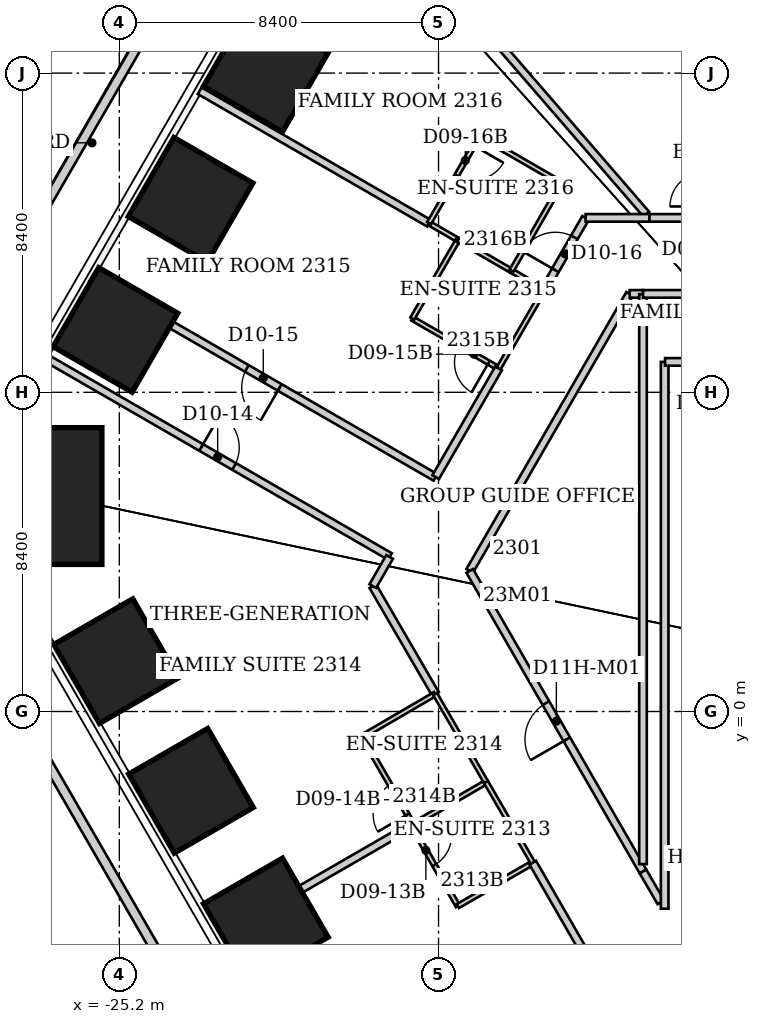
"""IFC4 building model, lengths in metres.
Left out: names, types, materials, properties, quantities, classifications, styles, units other than length and angle.
Written with IfcOpenShell. Run it as: python <this file> out.ifc"""

import sys

from ifc_helpers import new_model, si_unit, direction, frame, frame_2d, origin, origin_2d, place, context, subcontext, project, spatial, rectangle, extrude, clip, halfspace, element, fill, save


model = new_model("IFC4")
c1 = context("Model", 3, precision=1e-05, world=origin(), true_north=direction((0.0, 1.0)))
c2 = subcontext(c1, "Body", "Model", "MODEL_VIEW")
j1 = project(units=[si_unit("LENGTHUNIT", "METRE"), si_unit("PLANEANGLEUNIT", "RADIAN")], contexts=[c1])
p1 = place(None, origin())
s1 = spatial("IfcSite", under=j1, at=p1, CompositionType="ELEMENT")
p2 = place(p1, origin())
s2 = spatial("IfcBuilding", under=s1, at=p2, CompositionType="ELEMENT")
p3 = place(p2, frame((0.0, 0.0, 96.8)))
s3 = spatial("IfcBuildingStorey", under=s2, at=p3, CompositionType="ELEMENT", Elevation=96.8)
p4 = place(p3, frame((-21.344, -5.499, -0.056), z_axis=(0.0, 0.0, 1.0), x_axis=(-0.866025403784, -0.5, 0.0)))
e1 = element("IfcColumn", 1, at=p4, inside=s3, PredefinedType="COLUMN", context=c2, shape_type="SweptSolid", body=[
    clip(extrude(rectangle(XDim=2.4, YDim=2.4, at=origin_2d()), origin(), (0.0, 0.0, 1.0), 3.856), halfspace(frame((0.0, 0.0, 0.056)), True)),
])
p5 = place(p3, frame((-23.314, -2.087, -0.064), z_axis=(0.0, 0.0, 1.0), x_axis=(-0.866025403784, -0.5, 0.0)))
e2 = element("IfcColumn", 2, at=p5, inside=s3, PredefinedType="COLUMN", context=c2, shape_type="SweptSolid", body=[
    clip(extrude(rectangle(XDim=2.4, YDim=2.4, at=origin_2d()), origin(), (0.0, 0.0, 1.0), 3.865), halfspace(frame((0.0, 0.0, 0.064)), True)),
])
p6 = place(p3, frame((-25.284, 1.325, -0.073), z_axis=(0.0, 0.0, 1.0), x_axis=(-0.866025403784, -0.5, 0.0)))
e3 = element("IfcColumn", 3, at=p6, inside=s3, PredefinedType="COLUMN", context=c2, shape_type="SweptSolid", body=[
    clip(extrude(rectangle(XDim=2.4, YDim=2.4, at=origin_2d()), origin(), (0.0, 0.0, 1.0), 3.873), halfspace(frame((0.0, 0.0, 0.073)), True)),
])
p7 = place(p3, frame((-26.857, 5.67, -0.074), z_axis=(0.0, 0.0, 1.0), x_axis=(-1.0, 0.0, 0.0)))
e4 = element("IfcColumn", 4, at=p7, inside=s3, PredefinedType="COLUMN", context=c2, shape_type="SweptSolid", body=[
    clip(extrude(rectangle(XDim=2.4, YDim=3.6, at=origin_2d()), origin(), (0.0, 0.0, 1.0), 3.874), halfspace(frame((0.0, 0.0, 0.074)), True)),
])
p8 = place(p3, frame((-25.302, 10.041, -0.063), z_axis=(0.0, 0.0, 1.0), x_axis=(-0.866025403784, 0.5, 0.0)))
e5 = element("IfcColumn", 5, at=p8, inside=s3, PredefinedType="COLUMN", context=c2, shape_type="SweptSolid", body=[
    clip(extrude(rectangle(XDim=2.4, YDim=2.4, at=origin_2d()), origin(), (0.0, 0.0, 1.0), 3.863), halfspace(frame((0.0, 0.0, 0.063)), True)),
])
p9 = place(p3, frame((-23.324, 13.466, -0.055), z_axis=(0.0, 0.0, 1.0), x_axis=(-0.866025403784, 0.5, 0.0)))
e6 = element("IfcColumn", 6, at=p9, inside=s3, PredefinedType="COLUMN", context=c2, shape_type="SweptSolid", body=[
    clip(extrude(rectangle(XDim=2.4, YDim=2.4, at=origin_2d()), origin(), (0.0, 0.0, 1.0), 3.855), halfspace(frame((0.0, 0.0, 0.055)), True)),
])
p10 = place(p3, frame((-21.346, 16.891, -0.063), z_axis=(0.0, 0.0, 1.0), x_axis=(-0.866025403784, 0.5, 0.0)))
e7 = element("IfcColumn", 7, at=p10, inside=s3, PredefinedType="COLUMN", context=c2, shape_type="SweptSolid", body=[
    clip(extrude(rectangle(XDim=2.4, YDim=2.4, at=origin_2d()), origin(), (0.0, 0.0, 1.0), 3.863), halfspace(frame((0.0, 0.0, 0.063)), True)),
])
p11 = place(p3, frame((-21.475, 23.139, 0.0), z_axis=(0.0, 0.0, 1.0), x_axis=(-0.499999656836, -0.86602560191, 0.0)))
e8 = element("IfcWall", 8, at=p11, inside=s3, PredefinedType="PARAPET", context=c2, shape_type="SweptSolid", body=[
    extrude(rectangle(XDim=18.602, YDim=0.25, at=frame_2d((9.301, 0.0))), origin(), (0.0, 0.0, 1.0), 1.1),
])
p12 = place(p3, frame((-30.775, 5.038, 0.0), z_axis=(0.0, 0.0, 1.0), x_axis=(0.499999235055, -0.866025845425, 0.0)))
e9 = element("IfcWall", 9, at=p12, inside=s3, PredefinedType="PARAPET", context=c2, shape_type="SweptSolid", body=[
    extrude(rectangle(XDim=39.5, YDim=0.25, at=frame_2d((19.75, 0.0))), origin(), (0.0, 0.0, 1.0), 1.1),
])
p13 = place(p3, frame((-27.144, 9.315, 0.0), z_axis=(0.0, 0.0, 1.0), x_axis=(0.865951726818, -0.500127590541, 0.0)))
e10 = element("IfcWall", 10, at=p13, inside=s3, PredefinedType="PARTITIONING", context=c2, shape_type="SweptSolid", body=[
    extrude(rectangle(XDim=10.467, YDim=0.2, at=frame_2d((5.233, 0.0))), origin(), (0.0, 0.0, 1.0), 3.64),
])
p14 = place(p13, frame((4.734, 0.0, 0.0)))
e11 = element("IfcOpeningElement", 11, at=p14, cuts=e10, PredefinedType="OPENING", context=c2, shape_type="SweptSolid", body=[
    extrude(rectangle(XDim=1.0, YDim=2.13, at=frame_2d((0.5, 1.065))), frame((0.0, 0.1, 0.0), z_axis=(0.0, -1.0, 0.0), x_axis=(1.0, 0.0, 0.0)), (0.0, 0.0, 1.0), 0.2),
])
p15 = place(p3, frame((-23.084, 16.335, 0.0), z_axis=(0.0, 0.0, 1.0), x_axis=(0.865889693368, -0.500234983702, 0.0)))
e12 = element("IfcWall", 12, at=p15, inside=s3, PredefinedType="PARTITIONING", context=c2, shape_type="SweptSolid", body=[
    extrude(rectangle(XDim=6.968, YDim=0.2, at=frame_2d((3.484, 0.0))), origin(), (0.0, 0.0, 1.0), 3.64),
])
p16 = place(p3, frame((-18.81, -0.66, 0.0), z_axis=(0.0, 0.0, 1.0), x_axis=(0.501789229896, -0.86498992408, 0.0)))
e13 = element("IfcWall", 13, at=p16, inside=s3, PredefinedType="PARTITIONING", context=c2, shape_type="SweptSolid", body=[
    extrude(rectangle(XDim=2.671, YDim=0.12, at=frame_2d((1.335, 0.0))), origin(), (0.0, 0.0, 1.0), 3.64),
])
p17 = place(p16, frame((1.47, 0.0, 0.0)))
e14 = element("IfcOpeningElement", 14, at=p17, cuts=e13, PredefinedType="OPENING", context=c2, shape_type="SweptSolid", body=[
    extrude(rectangle(XDim=0.9, YDim=2.03, at=frame_2d((0.45, 1.015))), frame((0.0, 0.06, 0.0), z_axis=(0.0, -1.0, 0.0), x_axis=(1.0, 0.0, 0.0)), (0.0, 0.0, 1.0), 0.12),
])
p18 = place(p3, frame((-18.53, 3.3, 0.0), z_axis=(0.0, 0.0, 1.0), x_axis=(0.502321995867, -0.864680641895, 0.0)))
e15 = element("IfcWall", 15, at=p18, inside=s3, PredefinedType="PARTITIONING", context=c2, shape_type="SweptSolid", body=[
    extrude(rectangle(XDim=3.285, YDim=0.2, at=frame_2d((1.642, 0.0))), origin(), (0.0, 0.0, 1.0), 3.64),
])
p19 = place(p3, frame((-18.087, 4.067, 0.0), z_axis=(0.0, 0.0, 1.0), x_axis=(-0.499905448813, -0.866079986056, 0.0)))
e16 = element("IfcWall", 16, at=p19, inside=s3, PredefinedType="PARTITIONING", context=c2, shape_type="SweptSolid", body=[
    extrude(rectangle(XDim=0.885, YDim=0.2, at=frame_2d((0.443, 0.0))), origin(), (0.0, 0.0, 1.0), 3.64),
])
p20 = place(p3, frame((-17.51, -3.0, 0.0), z_axis=(0.0, 0.0, 1.0), x_axis=(0.864434275542, 0.502745843611, 0.0)))
e17 = element("IfcWall", 17, at=p20, inside=s3, PredefinedType="PARTITIONING", context=c2, shape_type="SweptSolid", body=[
    extrude(rectangle(XDim=2.267, YDim=0.12, at=frame_2d((1.134, 0.0))), origin(), (0.0, 0.0, 1.0), 3.64),
])
p21 = place(p3, frame((-17.508, -3.004, 0.0), z_axis=(0.0, 0.0, 1.0), x_axis=(0.498775507858, -0.866731211369, 0.0)))
e18 = element("IfcWall", 18, at=p21, inside=s3, PredefinedType="PARTITIONING", context=c2, shape_type="SweptSolid", body=[
    extrude(rectangle(XDim=2.441, YDim=0.12, at=frame_2d((1.22, 0.0))), origin(), (0.0, 0.0, 1.0), 3.64),
])
p22 = place(p21, frame((0.3, 0.0, 0.0)))
e19 = element("IfcOpeningElement", 19, at=p22, cuts=e18, PredefinedType="OPENING", context=c2, shape_type="SweptSolid", body=[
    extrude(rectangle(XDim=0.9, YDim=2.03, at=frame_2d((0.45, 1.015))), frame((0.0, 0.06, 0.0), z_axis=(0.0, -1.0, 0.0), x_axis=(1.0, 0.0, 0.0)), (0.0, 0.0, 1.0), 0.12),
])
p23 = place(p3, frame((-17.49, 10.34, 0.0), z_axis=(0.0, 0.0, 1.0), x_axis=(0.866114241029, -0.499846097802, 0.0)))
e20 = element("IfcWall", 20, at=p23, inside=s3, PredefinedType="PARTITIONING", context=c2, shape_type="SweptSolid", body=[
    extrude(rectangle(XDim=2.621, YDim=0.12, at=frame_2d((1.311, 0.0))), origin(), (0.0, 0.0, 1.0), 3.64),
])
p24 = place(p23, frame((1.421, 0.0, 0.0)))
e21 = element("IfcOpeningElement", 21, at=p24, cuts=e20, PredefinedType="OPENING", context=c2, shape_type="SweptSolid", body=[
    extrude(rectangle(XDim=0.9, YDim=2.03, at=frame_2d((0.45, 1.015))), frame((0.0, 0.06, 0.0), z_axis=(0.0, -1.0, 0.0), x_axis=(1.0, 0.0, 0.0)), (0.0, 0.0, 1.0), 0.12),
])
p25 = place(p3, frame((-17.47, -2.97, 0.0), z_axis=(0.0, 0.0, 1.0), x_axis=(-0.865919350456, -0.50018364478, 0.0)))
e22 = element("IfcWall", 22, at=p25, inside=s3, PredefinedType="PARTITIONING", context=c2, shape_type="SweptSolid", body=[
    extrude(rectangle(XDim=5.758, YDim=0.2, at=frame_2d((2.879, 0.0))), origin(), (0.0, 0.0, 1.0), 3.64),
])
p26 = place(p3, frame((-17.051, 12.849, 0.0), z_axis=(0.0, 0.0, 1.0), x_axis=(0.865838315616, -0.500323906295, 0.0)))
e23 = element("IfcWall", 23, at=p26, inside=s3, PredefinedType="PARTITIONING", context=c2, shape_type="SweptSolid", body=[
    extrude(rectangle(XDim=0.878, YDim=0.12, at=frame_2d((0.439, 0.0))), origin(), (0.0, 0.0, 1.0), 3.64),
])
p27 = place(p3, frame((-16.89, 0.46, 0.0), z_axis=(0.0, 0.0, 1.0), x_axis=(-0.863822716314, -0.503795905878, 0.0)))
e24 = element("IfcWall", 24, at=p27, inside=s3, PredefinedType="PARTITIONING", context=c2, shape_type="SweptSolid", body=[
    extrude(rectangle(XDim=2.223, YDim=0.12, at=frame_2d((1.111, 0.0))), origin(), (0.0, 0.0, 1.0), 3.64),
])
p28 = place(p3, frame((-16.88, 6.16, 0.0), z_axis=(0.0, 0.0, 1.0), x_axis=(-0.86594745947, 0.500134979218, 0.0)))
e25 = element("IfcWall", 25, at=p28, inside=s3, PredefinedType="PARTITIONING", context=c2, shape_type="SweptSolid", body=[
    extrude(rectangle(XDim=10.467, YDim=0.2, at=frame_2d((5.234, 0.0))), origin(), (0.0, 0.0, 1.0), 3.64),
])
p29 = place(p28, frame((4.734, 0.0, 0.0)))
e26 = element("IfcOpeningElement", 26, at=p29, cuts=e25, PredefinedType="OPENING", context=c2, shape_type="SweptSolid", body=[
    extrude(rectangle(XDim=1.0, YDim=2.13, at=frame_2d((0.5, 1.065))), frame((0.0, 0.1, 0.0), z_axis=(0.0, -1.0, 0.0), x_axis=(1.0, 0.0, 0.0)), (0.0, 0.0, 1.0), 0.2),
])
p30 = place(p3, frame((-16.875, 6.169, 0.0), z_axis=(0.0, 0.0, 1.0), x_axis=(0.500689767595, 0.865626799854, 0.0)))
e27 = element("IfcWall", 27, at=p30, inside=s3, PredefinedType="PARTITIONING", context=c2, shape_type="SweptSolid", body=[
    extrude(rectangle(XDim=3.305, YDim=0.2, at=frame_2d((1.653, 0.0))), origin(), (0.0, 0.0, 1.0), 3.64),
])
p31 = place(p3, frame((-16.29, -5.12, 0.0), z_axis=(0.0, 0.0, 1.0), x_axis=(0.865497265561, 0.500913648553, 0.0)))
e28 = element("IfcWall", 28, at=p31, inside=s3, PredefinedType="PARTITIONING", context=c2, shape_type="SweptSolid", body=[
    extrude(rectangle(XDim=2.276, YDim=0.12, at=frame_2d((1.138, 0.0))), origin(), (0.0, 0.0, 1.0), 3.64),
])
p32 = place(p3, frame((-16.29, 12.41, 0.0), z_axis=(0.0, 0.0, 1.0), x_axis=(-0.501547039172, -0.865130376012, 0.0)))
e29 = element("IfcWall", 29, at=p32, inside=s3, PredefinedType="PARTITIONING", context=c2, shape_type="SweptSolid", body=[
    extrude(rectangle(XDim=2.393, YDim=0.12, at=frame_2d((1.196, 0.0))), origin(), (0.0, 0.0, 1.0), 3.64),
])
p33 = place(p3, frame((-16.29, 12.41, 0.0), z_axis=(0.0, 0.0, 1.0), x_axis=(0.866138091645, -0.499804768086, 0.0)))
e30 = element("IfcWall", 30, at=p33, inside=s3, PredefinedType="PARTITIONING", context=c2, shape_type="SweptSolid", body=[
    extrude(rectangle(XDim=1.626, YDim=0.12, at=frame_2d((0.813, 0.0))), origin(), (0.0, 0.0, 1.0), 3.64),
])
p34 = place(p3, frame((-15.98, 3.7, 0.0), z_axis=(0.0, 0.0, 1.0), x_axis=(0.500093981358, 0.865971136822, 0.0)))
e31 = element("IfcWall", 31, at=p34, inside=s3, PredefinedType="PARTITIONING", context=c2, shape_type="SweptSolid", body=[
    extrude(rectangle(XDim=8.418, YDim=0.2, at=frame_2d((4.209, 0.0))), origin(), (0.0, 0.0, 1.0), 3.64),
])
p35 = place(p3, frame((-15.72, 15.15, 0.0), z_axis=(0.0, 0.0, 1.0), x_axis=(-0.500605174168, -0.865675724273, 0.0)))
e32 = element("IfcWall", 32, at=p35, inside=s3, PredefinedType="PARTITIONING", context=c2, shape_type="SweptSolid", body=[
    extrude(rectangle(XDim=2.657, YDim=0.12, at=frame_2d((1.329, 0.0))), origin(), (0.0, 0.0, 1.0), 3.64),
])
p36 = place(p35, frame((0.3, 0.0, 0.0)))
e33 = element("IfcOpeningElement", 33, at=p36, cuts=e32, PredefinedType="OPENING", context=c2, shape_type="SweptSolid", body=[
    extrude(rectangle(XDim=0.9, YDim=2.03, at=frame_2d((0.45, 1.015))), frame((0.0, 0.06, 0.0), z_axis=(0.0, -1.0, 0.0), x_axis=(1.0, 0.0, 0.0)), (0.0, 0.0, 1.0), 0.12),
])
p37 = place(p3, frame((-15.55, -1.86, 0.0), z_axis=(0.0, 0.0, 1.0), x_axis=(-0.500098439427, 0.865968562295, 0.0)))
e34 = element("IfcWall", 34, at=p37, inside=s3, PredefinedType="PARTITIONING", context=c2, shape_type="SweptSolid", body=[
    extrude(rectangle(XDim=2.679, YDim=0.12, at=frame_2d((1.34, 0.0))), origin(), (0.0, 0.0, 1.0), 3.64),
])
p38 = place(p3, frame((-15.55, -1.86, 0.0), z_axis=(0.0, 0.0, 1.0), x_axis=(0.501856726365, -0.86495076519, 0.0)))
e35 = element("IfcWall", 35, at=p38, inside=s3, PredefinedType="PARTITIONING", context=c2, shape_type="SweptSolid", body=[
    extrude(rectangle(XDim=2.451, YDim=0.12, at=frame_2d((1.226, 0.0))), origin(), (0.0, 0.0, 1.0), 3.64),
])
p39 = place(p3, frame((-15.22, 9.03, 0.0), z_axis=(0.0, 0.0, 1.0), x_axis=(0.501502765098, 0.865156041763, 0.0)))
e36 = element("IfcWall", 36, at=p39, inside=s3, PredefinedType="PARTITIONING", context=c2, shape_type="SweptSolid", body=[
    extrude(rectangle(XDim=2.393, YDim=0.12, at=frame_2d((1.196, 0.0))), origin(), (0.0, 0.0, 1.0), 3.64),
])
p40 = place(p3, frame((-14.882, 11.597, 0.0), z_axis=(0.0, 0.0, 1.0), x_axis=(0.866181499781, -0.499729536286, 0.0)))
e37 = element("IfcWall", 37, at=p40, inside=s3, PredefinedType="PARTITIONING", context=c2, shape_type="SweptSolid", body=[
    extrude(rectangle(XDim=0.995, YDim=0.12, at=frame_2d((0.497, 0.0))), origin(), (0.0, 0.0, 1.0), 3.64),
])
p41 = place(p3, frame((-14.88, 11.6, 0.0), z_axis=(0.0, 0.0, 1.0), x_axis=(0.497704656183, 0.867346571569, 0.0)))
e38 = element("IfcWall", 38, at=p41, inside=s3, PredefinedType="PARTITIONING", context=c2, shape_type="SweptSolid", body=[
    extrude(rectangle(XDim=2.652, YDim=0.12, at=frame_2d((1.326, 0.0))), origin(), (0.0, 0.0, 1.0), 3.64),
])
p42 = place(p3, frame((-14.32, -3.98, 0.0), z_axis=(0.0, 0.0, 1.0), x_axis=(0.499495696009, -0.866316368118, 0.0)))
e39 = element("IfcWall", 39, at=p42, inside=s3, PredefinedType="PARTITIONING", context=c2, shape_type="SweptSolid", body=[
    extrude(rectangle(XDim=8.669, YDim=0.2, at=frame_2d((4.334, 0.0))), origin(), (0.0, 0.0, 1.0), 3.64),
])
p43 = place(p42, frame((3.834, 0.0, 0.0)))
e40 = element("IfcOpeningElement", 40, at=p43, cuts=e39, PredefinedType="OPENING", context=c2, shape_type="SweptSolid", body=[
    extrude(rectangle(XDim=1.0, YDim=2.13, at=frame_2d((0.5, 1.065))), frame((0.0, 0.1, 0.0), z_axis=(0.0, -1.0, 0.0), x_axis=(1.0, 0.0, 0.0)), (0.0, 0.0, 1.0), 0.2),
])
p44 = place(p3, frame((-14.02, 11.1, 0.0), z_axis=(0.0, 0.0, 1.0), x_axis=(0.499641723021, 0.866232156305, 0.0)))
e41 = element("IfcWall", 41, at=p44, inside=s3, PredefinedType="PARTITIONING", context=c2, shape_type="SweptSolid", body=[
    extrude(rectangle(XDim=2.182, YDim=0.2, at=frame_2d((1.091, 0.0))), origin(), (0.0, 0.0, 1.0), 3.64),
])
p45 = place(p44, frame((0.591, 0.0, 0.0)))
e42 = element("IfcOpeningElement", 42, at=p45, cuts=e41, PredefinedType="OPENING", context=c2, shape_type="SweptSolid", body=[
    extrude(rectangle(XDim=1.0, YDim=2.13, at=frame_2d((0.5, 1.065))), frame((0.0, 0.1, 0.0), z_axis=(0.0, -1.0, 0.0), x_axis=(1.0, 0.0, 0.0)), (0.0, 0.0, 1.0), 0.2),
])
p46 = place(p3, frame((-13.56, 13.9, 0.0), z_axis=(0.0, 0.0, 1.0), x_axis=(-0.865508881864, 0.500893576935, 0.0)))
e43 = element("IfcWall", 43, at=p46, inside=s3, PredefinedType="PARTITIONING", context=c2, shape_type="SweptSolid", body=[
    extrude(rectangle(XDim=2.496, YDim=0.12, at=frame_2d((1.248, 0.0))), origin(), (0.0, 0.0, 1.0), 3.64),
])
p47 = place(p3, frame((-11.77, 10.99, 0.0), z_axis=(0.0, 0.0, 1.0), x_axis=(1.0, 0.0, 0.0)))
e44 = element("IfcWall", 44, at=p47, inside=s3, PredefinedType="PARTITIONING", context=c2, shape_type="SweptSolid", body=[
    extrude(rectangle(XDim=0.35, YDim=0.2, at=frame_2d((0.175, 0.0))), origin(), (0.0, 0.0, 1.0), 3.64),
])
p48 = place(p3, frame((-11.42, -4.21, 0.0), z_axis=(0.0, 0.0, 1.0), x_axis=(-0.499446957289, 0.866344467781, 0.0)))
e45 = element("IfcWall", 45, at=p48, inside=s3, PredefinedType="PARTITIONING", context=c2, shape_type="SweptSolid", body=[
    extrude(rectangle(XDim=9.13, YDim=0.2, at=frame_2d((4.565, 0.0))), origin(), (0.0, 0.0, 1.0), 3.64),
])
p49 = place(p48, frame((4.015, 0.0, 0.0)))
e46 = element("IfcOpeningElement", 46, at=p49, cuts=e45, PredefinedType="OPENING", context=c2, shape_type="SweptSolid", body=[
    extrude(rectangle(XDim=1.1, YDim=2.2, at=frame_2d((0.55, 1.1))), frame((0.0, 0.1, 0.0), z_axis=(0.0, -1.0, 0.0), x_axis=(1.0, 0.0, 0.0)), (0.0, 0.0, 1.0), 0.2),
])
p50 = place(p3, frame((-11.42, 10.98, 0.0), z_axis=(0.0, 0.0, 1.0), x_axis=(0.0, -1.0, 0.0)))
e47 = element("IfcWall", 47, at=p50, inside=s3, PredefinedType="PARTITIONING", context=c2, shape_type="SweptSolid", body=[
    extrude(rectangle(XDim=14.995, YDim=0.2, at=frame_2d((7.498, 0.0))), origin(), (0.0, 0.0, 1.0), 3.64),
])
p51 = place(p3, frame((-11.42, 10.99, 0.0), z_axis=(0.0, 0.0, 1.0), x_axis=(1.0, 0.0, 0.0)))
e48 = element("IfcWall", 48, at=p51, inside=s3, PredefinedType="PARTITIONING", context=c2, shape_type="SweptSolid", body=[
    extrude(rectangle(XDim=4.57, YDim=0.2, at=frame_2d((2.285, 0.0))), origin(), (0.0, 0.0, 1.0), 3.64),
])
p52 = place(p51, frame((1.735, 0.0, 0.0)))
e49 = element("IfcOpeningElement", 49, at=p52, cuts=e48, PredefinedType="OPENING", context=c2, shape_type="SweptSolid", body=[
    extrude(rectangle(XDim=1.1, YDim=2.2, at=frame_2d((0.55, 1.1))), frame((0.0, 0.1, 0.0), z_axis=(0.0, -1.0, 0.0), x_axis=(1.0, 0.0, 0.0)), (0.0, 0.0, 1.0), 0.2),
])
p53 = place(p3, frame((-11.335, 13.088, 0.0), z_axis=(0.0, 0.0, 1.0), x_axis=(-0.654526953183, 0.75603866803, 0.0)))
e50 = element("IfcWall", 50, at=p53, inside=s3, PredefinedType="PARTITIONING", context=c2, shape_type="SweptSolid", body=[
    extrude(rectangle(XDim=11.956, YDim=0.2, at=frame_2d((5.978, 0.0))), origin(), (0.0, 0.0, 1.0), 3.64),
])
p54 = place(p3, frame((-11.25, 12.99, 0.0), z_axis=(0.0, 0.0, 1.0), x_axis=(-1.0, 0.0, 0.0)))
e51 = element("IfcWall", 51, at=p54, inside=s3, PredefinedType="PARTITIONING", context=c2, shape_type="SweptSolid", body=[
    extrude(rectangle(XDim=1.68, YDim=0.2, at=frame_2d((0.84, 0.0))), origin(), (0.0, 0.0, 1.0), 3.64),
])
p55 = place(p3, frame((-10.948, -5.021, 0.0), z_axis=(0.0, 0.0, 1.0), x_axis=(-0.502706337432, 0.86445725071, 0.0)))
e52 = element("IfcWall", 52, at=p55, inside=s3, PredefinedType="PARTITIONING", context=c2, shape_type="SweptSolid", body=[
    extrude(rectangle(XDim=0.939, YDim=0.2, at=frame_2d((0.469, 0.0))), origin(), (0.0, 0.0, 1.0), 3.64),
])
p56 = place(p3, frame((-10.85, 9.2, 0.0), z_axis=(0.0, 0.0, 1.0), x_axis=(0.0, -1.0, 0.0)))
e53 = element("IfcWall", 53, at=p56, inside=s3, PredefinedType="PARTITIONING", context=c2, shape_type="SweptSolid", body=[
    extrude(rectangle(XDim=14.39, YDim=0.2, at=frame_2d((7.195, 0.0))), origin(), (0.0, 0.0, 1.0), 3.64),
])
p57 = place(p3, frame((-9.81, 12.99, 0.0), z_axis=(0.0, 0.0, 1.0), x_axis=(-1.0, 0.0, 0.0)))
e54 = element("IfcWall", 54, at=p57, inside=s3, PredefinedType="PARTITIONING", context=c2, shape_type="SweptSolid", body=[
    extrude(rectangle(XDim=1.44, YDim=0.2, at=frame_2d((0.72, 0.0))), origin(), (0.0, 0.0, 1.0), 3.64),
])
p58 = place(p3, frame((-6.85, 9.2, 0.0), z_axis=(0.0, 0.0, 1.0), x_axis=(-1.0, 0.0, 0.0)))
e55 = element("IfcWall", 55, at=p58, inside=s3, PredefinedType="PARTITIONING", context=c2, shape_type="SweptSolid", body=[
    extrude(rectangle(XDim=3.99, YDim=0.2, at=frame_2d((1.995, 0.0))), origin(), (0.0, 0.0, 1.0), 3.64),
])
p59 = place(p22, origin())
e56 = element("IfcDoor", 56, at=p59, inside=s3, OperationType="SINGLE_SWING_LEFT", PredefinedType="DOOR", context=c2, shape_type="SweptSolid", body=[
    extrude(rectangle(XDim=0.9, YDim=2.03, at=frame_2d((0.45, 1.015))), frame((0.0, 0.025, 0.0), z_axis=(0.0, -1.0, 0.0), x_axis=(1.0, 0.0, 0.0)), (0.0, 0.0, 1.0), 0.05),
])
fill(e19, e56)
p60 = place(p14, origin())
e57 = element("IfcDoor", 57, at=p60, inside=s3, OperationType="SINGLE_SWING_LEFT", PredefinedType="DOOR", context=c2, shape_type="SweptSolid", body=[
    extrude(rectangle(XDim=1.0, YDim=2.13, at=frame_2d((0.5, 1.065))), frame((0.0, 0.025, 0.0), z_axis=(0.0, -1.0, 0.0), x_axis=(1.0, 0.0, 0.0)), (0.0, 0.0, 1.0), 0.05),
])
fill(e11, e57)
p61 = place(p17, origin())
e58 = element("IfcDoor", 58, at=p61, inside=s3, OperationType="SINGLE_SWING_RIGHT", PredefinedType="DOOR", context=c2, shape_type="SweptSolid", body=[
    extrude(rectangle(XDim=0.9, YDim=2.03, at=frame_2d((0.45, 1.015))), frame((0.0, 0.025, 0.0), z_axis=(0.0, -1.0, 0.0), x_axis=(1.0, 0.0, 0.0)), (0.0, 0.0, 1.0), 0.05),
])
fill(e14, e58)
p62 = place(p29, origin())
e59 = element("IfcDoor", 59, at=p62, inside=s3, OperationType="SINGLE_SWING_LEFT", PredefinedType="DOOR", context=c2, shape_type="SweptSolid", body=[
    extrude(rectangle(XDim=1.0, YDim=2.13, at=frame_2d((0.5, 1.065))), frame((0.0, 0.025, 0.0), z_axis=(0.0, -1.0, 0.0), x_axis=(1.0, 0.0, 0.0)), (0.0, 0.0, 1.0), 0.05),
])
fill(e26, e59)
p63 = place(p24, origin())
e60 = element("IfcDoor", 60, at=p63, inside=s3, OperationType="SINGLE_SWING_RIGHT", PredefinedType="DOOR", context=c2, shape_type="SweptSolid", body=[
    extrude(rectangle(XDim=0.9, YDim=2.03, at=frame_2d((0.45, 1.015))), frame((0.0, 0.025, 0.0), z_axis=(0.0, -1.0, 0.0), x_axis=(1.0, 0.0, 0.0)), (0.0, 0.0, 1.0), 0.05),
])
fill(e21, e60)
p64 = place(p45, origin())
e61 = element("IfcDoor", 61, at=p64, inside=s3, OperationType="SINGLE_SWING_LEFT", PredefinedType="DOOR", context=c2, shape_type="SweptSolid", body=[
    extrude(rectangle(XDim=1.0, YDim=2.13, at=frame_2d((0.5, 1.065))), frame((0.0, 0.025, 0.0), z_axis=(0.0, -1.0, 0.0), x_axis=(1.0, 0.0, 0.0)), (0.0, 0.0, 1.0), 0.05),
])
fill(e42, e61)
p65 = place(p36, origin())
e62 = element("IfcDoor", 62, at=p65, inside=s3, OperationType="SINGLE_SWING_LEFT", PredefinedType="DOOR", context=c2, shape_type="SweptSolid", body=[
    extrude(rectangle(XDim=0.9, YDim=2.03, at=frame_2d((0.45, 1.015))), frame((0.0, 0.025, 0.0), z_axis=(0.0, -1.0, 0.0), x_axis=(1.0, 0.0, 0.0)), (0.0, 0.0, 1.0), 0.05),
])
fill(e33, e62)
p66 = place(p49, origin())
e63 = element("IfcDoor", 63, at=p66, inside=s3, OperationType="SINGLE_SWING_LEFT", PredefinedType="DOOR", context=c2, shape_type="SweptSolid", body=[
    extrude(rectangle(XDim=1.1, YDim=2.2, at=frame_2d((0.55, 1.1))), frame((0.0, 0.025, 0.0), z_axis=(0.0, -1.0, 0.0), x_axis=(1.0, 0.0, 0.0)), (0.0, 0.0, 1.0), 0.05),
])
fill(e46, e63)
save(model, sys.argv[1])
